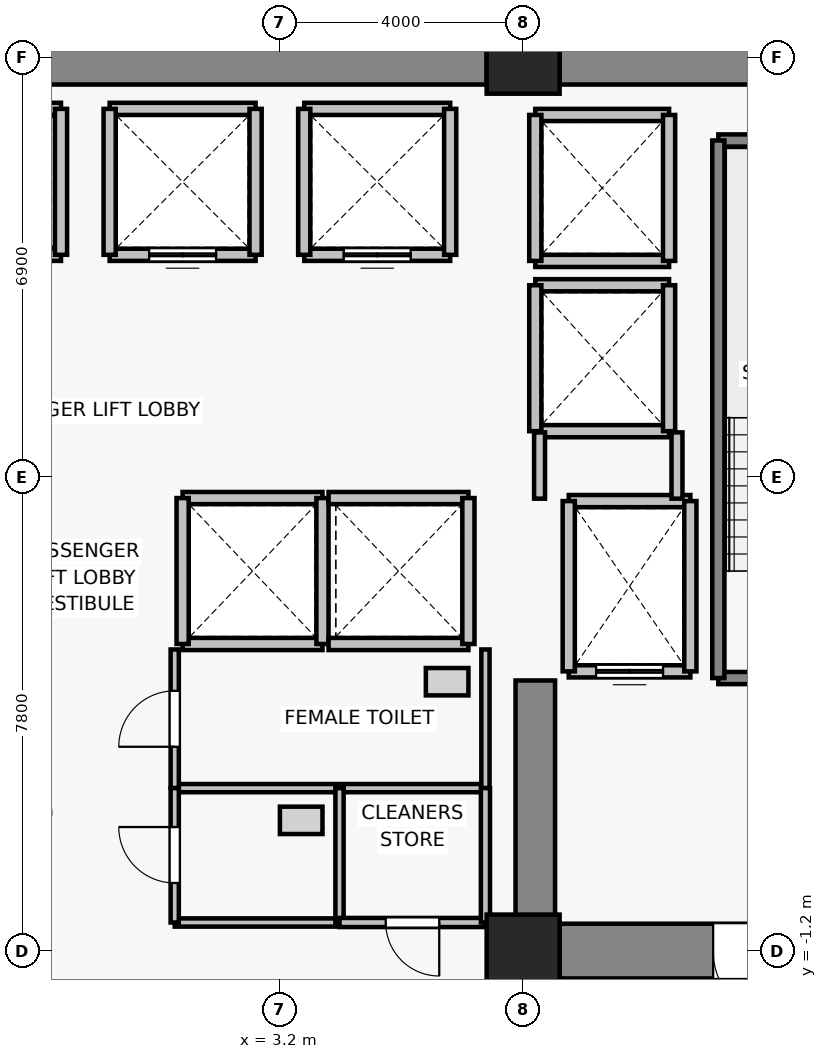
"""IFC4 building model, lengths in metres.
Left out: names, types, materials, properties, quantities, classifications, styles, units other than length and angle.
Written with IfcOpenShell. Run it as: python <this file> out.ifc"""

import sys

from ifc_helpers import new_model, si_unit, direction, frame, frame_2d, origin, origin_2d, place, context, subcontext, project, spatial, rectangle, extrude, source, transform, mapped, element, fill, save


model = new_model("IFC4")
c1 = context("Model", 3, precision=1e-05, world=origin(), true_north=direction((0.0, 1.0)))
c2 = subcontext(c1, "Body", "Model", "MODEL_VIEW")
j1 = project(units=[si_unit("LENGTHUNIT", "METRE"), si_unit("PLANEANGLEUNIT", "RADIAN")], contexts=[c1])
p1 = place(None, origin())
s1 = spatial("IfcSite", under=j1, at=p1, CompositionType="ELEMENT")
p2 = place(p1, origin())
s2 = spatial("IfcBuilding", under=s1, at=p2, CompositionType="ELEMENT")
p3 = place(p2, frame((0.0, 0.0, 76.9)))
s3 = spatial("IfcBuildingStorey", under=s2, at=p3, CompositionType="ELEMENT", Elevation=76.9)
for number, where, z_axis, x_axis in (
    (1, (7.2, -1.2, 0.0), (0.0, 0.0, 1.0), (1.0, 0.0, 0.0)),
    (2, (7.2, 13.5, 0.0), (0.0, 0.0, 1.0), (1.0, 0.0, 0.0)),
):
    element("IfcColumn", number, at=place(p3, frame(where, z_axis=z_axis, x_axis=x_axis)), inside=s3, PredefinedType="COLUMN", context=c2, shape_type="SweptSolid", body=[
        extrude(rectangle(XDim=1.2, YDim=1.2, at=origin_2d()), origin(), (0.0, 0.0, 1.0), 3.3),
    ])
p4 = place(p3, frame((-6.6, 13.5, 0.0), z_axis=(0.0, 0.0, 1.0), x_axis=(1.0, 0.0, 0.0)))
e3 = element("IfcWall", 3, at=p4, inside=s3, PredefinedType="SHEAR", context=c2, shape_type="SweptSolid", body=[
    extrude(rectangle(XDim=13.2, YDim=0.9, at=frame_2d((6.6, 0.0))), origin(), (0.0, 0.0, 1.0), 3.05),
])
p5 = place(p3, frame((7.8, 13.5, 0.0), z_axis=(0.0, 0.0, 1.0), x_axis=(1.0, 0.0, 0.0)))
e4 = element("IfcWall", 4, at=p5, inside=s3, PredefinedType="SHEAR", context=c2, shape_type="SweptSolid", body=[
    extrude(rectangle(XDim=6.0, YDim=0.9, at=frame_2d((3.0, 0.0))), origin(), (0.0, 0.0, 1.0), 3.05),
])
p6 = place(p3, frame((13.8, -1.2, 0.0), z_axis=(0.0, 0.0, 1.0), x_axis=(-1.0, 0.0, 0.0)))
e5 = element("IfcWall", 5, at=p6, inside=s3, PredefinedType="SHEAR", context=c2, shape_type="SweptSolid", body=[
    extrude(rectangle(XDim=6.0, YDim=0.9, at=frame_2d((3.0, 0.0))), origin(), (0.0, 0.0, 1.0), 3.05),
])
p7 = place(p6, frame((2.325, 0.0, 0.0)))
e6 = element("IfcOpeningElement", 6, at=p7, cuts=e5, PredefinedType="OPENING", context=c2, shape_type="SweptSolid", body=[
    extrude(rectangle(XDim=1.15, YDim=2.15, at=frame_2d((0.575, 1.075))), frame((0.0, 0.46, 0.0), z_axis=(0.0, -1.0, 0.0), x_axis=(1.0, 0.0, 0.0)), (0.0, 0.0, 1.0), 0.92),
])
p8 = place(p3, frame((7.4, -0.75, 0.0), z_axis=(0.0, 0.0, 1.0), x_axis=(0.0, 1.0, 0.0)))
e7 = element("IfcWall", 7, at=p8, inside=s3, PredefinedType="SHEAR", context=c2, shape_type="SweptSolid", body=[
    extrude(rectangle(XDim=4.0, YDim=0.65, at=frame_2d((2.0, 0.0))), origin(), (0.0, 0.0, 1.0), 3.05),
])
p9 = place(p3, frame((9.95, 3.4, 0.0), z_axis=(0.0, 0.0, 1.0), x_axis=(-1.0, 0.0, 0.0)))
e8 = element("IfcWall", 8, at=p9, inside=s3, PredefinedType="SOLIDWALL", context=c2, shape_type="SweptSolid", body=[
    extrude(rectangle(XDim=2.0, YDim=0.2, at=frame_2d((1.0, 0.0))), origin(), (0.0, 0.0, 1.0), 3.05),
])
p10 = place(p9, frame((0.45, 0.0, 0.0)))
e9 = element("IfcOpeningElement", 9, at=p10, cuts=e8, PredefinedType="OPENING", context=c2, shape_type="SweptSolid", body=[
    extrude(rectangle(XDim=1.1, YDim=2.2, at=frame_2d((0.55, 1.1))), frame((0.0, 0.11, 0.0), z_axis=(0.0, -1.0, 0.0), x_axis=(1.0, 0.0, 0.0)), (0.0, 0.0, 1.0), 0.22),
])
p11 = place(p3, frame((7.95, 6.2, 0.0), z_axis=(0.0, 0.0, 1.0), x_axis=(1.0, 0.0, 0.0)))
e10 = element("IfcWall", 10, at=p11, inside=s3, PredefinedType="SOLIDWALL", context=c2, shape_type="SweptSolid", body=[
    extrude(rectangle(XDim=2.0, YDim=0.2, at=frame_2d((1.0, 0.0))), origin(), (0.0, 0.0, 1.0), 3.05),
])
for number, where, z_axis, x_axis in (
    (11, (7.95, 3.4, 0.0), (0.0, 0.0, 1.0), (0.0, 1.0, 0.0)),
    (12, (9.95, 6.2, 0.0), (0.0, 0.0, 1.0), (0.0, -1.0, 0.0)),
):
    element("IfcWall", number, at=place(p3, frame(where, z_axis=z_axis, x_axis=x_axis)), inside=s3, PredefinedType="SOLIDWALL", context=c2, shape_type="SweptSolid", body=[
        extrude(rectangle(XDim=2.8, YDim=0.2, at=frame_2d((1.4, 0.0))), origin(), (0.0, 0.0, 1.0), 3.05),
    ])
p12 = place(p3, frame((-0.4, 10.25, 0.0), z_axis=(0.0, 0.0, 1.0), x_axis=(-1.0, 0.0, 0.0)))
e13 = element("IfcWall", 13, at=p12, inside=s3, PredefinedType="SOLIDWALL", context=c2, shape_type="SweptSolid", body=[
    extrude(rectangle(XDim=2.4, YDim=0.2, at=frame_2d((1.2, 0.0))), origin(), (0.0, 0.0, 1.0), 3.05),
])
p13 = place(p12, frame((0.65, 0.0, 0.0)))
e14 = element("IfcOpeningElement", 14, at=p13, cuts=e13, PredefinedType="OPENING", context=c2, shape_type="SweptSolid", body=[
    extrude(rectangle(XDim=1.1, YDim=2.2, at=frame_2d((0.55, 1.1))), frame((0.0, 0.11, 0.0), z_axis=(0.0, -1.0, 0.0), x_axis=(1.0, 0.0, 0.0)), (0.0, 0.0, 1.0), 0.22),
])
p14 = place(p3, frame((-2.8, 12.65, 0.0), z_axis=(0.0, 0.0, 1.0), x_axis=(1.0, 0.0, 0.0)))
e15 = element("IfcWall", 15, at=p14, inside=s3, PredefinedType="SOLIDWALL", context=c2, shape_type="SweptSolid", body=[
    extrude(rectangle(XDim=2.4, YDim=0.2, at=frame_2d((1.2, 0.0))), origin(), (0.0, 0.0, 1.0), 3.05),
])
p15 = place(p3, frame((-0.4, 12.65, 0.0), z_axis=(0.0, 0.0, 1.0), x_axis=(0.0, -1.0, 0.0)))
e16 = element("IfcWall", 16, at=p15, inside=s3, PredefinedType="SOLIDWALL", context=c2, shape_type="SweptSolid", body=[
    extrude(rectangle(XDim=2.4, YDim=0.2, at=frame_2d((1.2, 0.0))), origin(), (0.0, 0.0, 1.0), 3.05),
])
p16 = place(p3, frame((2.8, 10.25, 0.0), z_axis=(0.0, 0.0, 1.0), x_axis=(-1.0, 0.0, 0.0)))
e17 = element("IfcWall", 17, at=p16, inside=s3, PredefinedType="SOLIDWALL", context=c2, shape_type="SweptSolid", body=[
    extrude(rectangle(XDim=2.4, YDim=0.2, at=frame_2d((1.2, 0.0))), origin(), (0.0, 0.0, 1.0), 3.05),
])
p17 = place(p16, frame((0.65, 0.0, 0.0)))
e18 = element("IfcOpeningElement", 18, at=p17, cuts=e17, PredefinedType="OPENING", context=c2, shape_type="SweptSolid", body=[
    extrude(rectangle(XDim=1.1, YDim=2.2, at=frame_2d((0.55, 1.1))), frame((0.0, 0.11, 0.0), z_axis=(0.0, -1.0, 0.0), x_axis=(1.0, 0.0, 0.0)), (0.0, 0.0, 1.0), 0.22),
])
p18 = place(p3, frame((0.4, 12.65, 0.0), z_axis=(0.0, 0.0, 1.0), x_axis=(1.0, 0.0, 0.0)))
e19 = element("IfcWall", 19, at=p18, inside=s3, PredefinedType="SOLIDWALL", context=c2, shape_type="SweptSolid", body=[
    extrude(rectangle(XDim=2.4, YDim=0.2, at=frame_2d((1.2, 0.0))), origin(), (0.0, 0.0, 1.0), 3.05),
])
for number, where, z_axis, x_axis in (
    (20, (0.4, 10.25, 0.0), (0.0, 0.0, 1.0), (0.0, 1.0, 0.0)),
    (21, (2.8, 12.65, 0.0), (0.0, 0.0, 1.0), (0.0, -1.0, 0.0)),
):
    element("IfcWall", number, at=place(p3, frame(where, z_axis=z_axis, x_axis=x_axis)), inside=s3, PredefinedType="SOLIDWALL", context=c2, shape_type="SweptSolid", body=[
        extrude(rectangle(XDim=2.4, YDim=0.2, at=frame_2d((1.2, 0.0))), origin(), (0.0, 0.0, 1.0), 3.05),
    ])
p19 = place(p3, frame((6.0, 10.25, 0.0), z_axis=(0.0, 0.0, 1.0), x_axis=(-1.0, 0.0, 0.0)))
e22 = element("IfcWall", 22, at=p19, inside=s3, PredefinedType="SOLIDWALL", context=c2, shape_type="SweptSolid", body=[
    extrude(rectangle(XDim=2.4, YDim=0.2, at=frame_2d((1.2, 0.0))), origin(), (0.0, 0.0, 1.0), 3.05),
])
p20 = place(p19, frame((0.65, 0.0, 0.0)))
e23 = element("IfcOpeningElement", 23, at=p20, cuts=e22, PredefinedType="OPENING", context=c2, shape_type="SweptSolid", body=[
    extrude(rectangle(XDim=1.1, YDim=2.2, at=frame_2d((0.55, 1.1))), frame((0.0, 0.11, 0.0), z_axis=(0.0, -1.0, 0.0), x_axis=(1.0, 0.0, 0.0)), (0.0, 0.0, 1.0), 0.22),
])
for number, where, z_axis, x_axis in (
    (24, (3.6, 12.65, 0.0), (0.0, 0.0, 1.0), (1.0, 0.0, 0.0)),
    (25, (3.6, 10.25, 0.0), (0.0, 0.0, 1.0), (0.0, 1.0, 0.0)),
    (26, (6.0, 12.65, 0.0), (0.0, 0.0, 1.0), (0.0, -1.0, 0.0)),
):
    element("IfcWall", number, at=place(p3, frame(where, z_axis=z_axis, x_axis=x_axis)), inside=s3, PredefinedType="SOLIDWALL", context=c2, shape_type="SweptSolid", body=[
        extrude(rectangle(XDim=2.4, YDim=0.2, at=frame_2d((1.2, 0.0))), origin(), (0.0, 0.0, 1.0), 3.05),
    ])
for number, where, z_axis, x_axis in (
    (27, (3.9, 3.85, 0.0), (0.0, 0.0, 1.0), (-1.0, 0.0, 0.0)),
    (28, (1.6, 6.25, 0.0), (0.0, 0.0, 1.0), (1.0, 0.0, 0.0)),
):
    element("IfcWall", number, at=place(p3, frame(where, z_axis=z_axis, x_axis=x_axis)), inside=s3, PredefinedType="SOLIDWALL", context=c2, shape_type="SweptSolid", body=[
        extrude(rectangle(XDim=2.3, YDim=0.2, at=frame_2d((1.15, 0.0))), origin(), (0.0, 0.0, 1.0), 3.05),
    ])
for number, where, z_axis, x_axis in (
    (29, (1.6, 3.85, 0.0), (0.0, 0.0, 1.0), (0.0, 1.0, 0.0)),
    (30, (3.9, 6.25, 0.0), (0.0, 0.0, 1.0), (0.0, -1.0, 0.0)),
):
    element("IfcWall", number, at=place(p3, frame(where, z_axis=z_axis, x_axis=x_axis)), inside=s3, PredefinedType="SOLIDWALL", context=c2, shape_type="SweptSolid", body=[
        extrude(rectangle(XDim=2.4, YDim=0.2, at=frame_2d((1.2, 0.0))), origin(), (0.0, 0.0, 1.0), 3.05),
    ])
for number, where, z_axis, x_axis in (
    (31, (6.3, 3.85, 0.0), (0.0, 0.0, 1.0), (-1.0, 0.0, 0.0)),
    (32, (4.0, 6.25, 0.0), (0.0, 0.0, 1.0), (1.0, 0.0, 0.0)),
):
    element("IfcWall", number, at=place(p3, frame(where, z_axis=z_axis, x_axis=x_axis)), inside=s3, PredefinedType="SOLIDWALL", context=c2, shape_type="SweptSolid", body=[
        extrude(rectangle(XDim=2.3, YDim=0.2, at=frame_2d((1.15, 0.0))), origin(), (0.0, 0.0, 1.0), 3.05),
    ])
p21 = place(p3, frame((6.3, 6.25, 0.0), z_axis=(0.0, 0.0, 1.0), x_axis=(0.0, -1.0, 0.0)))
e33 = element("IfcWall", 33, at=p21, inside=s3, PredefinedType="SOLIDWALL", context=c2, shape_type="SweptSolid", body=[
    extrude(rectangle(XDim=2.4, YDim=0.2, at=frame_2d((1.2, 0.0))), origin(), (0.0, 0.0, 1.0), 3.05),
])
for number, where, z_axis, x_axis in (
    (34, (9.6, 7.35, 0.0), (0.0, 0.0, 1.0), (-1.0, 0.0, 0.0)),
    (35, (7.4, 9.75, 0.0), (0.0, 0.0, 1.0), (1.0, 0.0, 0.0)),
):
    element("IfcWall", number, at=place(p3, frame(where, z_axis=z_axis, x_axis=x_axis)), inside=s3, PredefinedType="SOLIDWALL", context=c2, shape_type="SweptSolid", body=[
        extrude(rectangle(XDim=2.2, YDim=0.2, at=frame_2d((1.1, 0.0))), origin(), (0.0, 0.0, 1.0), 2.44),
    ])
p22 = place(p3, frame((7.4, 7.35, 0.0), z_axis=(0.0, 0.0, 1.0), x_axis=(0.0, 1.0, 0.0)))
e36 = element("IfcWall", 36, at=p22, inside=s3, PredefinedType="SOLIDWALL", context=c2, shape_type="SweptSolid", body=[
    extrude(rectangle(XDim=2.4, YDim=0.2, at=frame_2d((1.2, 0.0))), origin(), (0.0, 0.0, 1.0), 2.44),
])
p23 = place(p3, frame((9.6, 9.75, 0.0), z_axis=(0.0, 0.0, 1.0), x_axis=(0.0, -1.0, 0.0)))
e37 = element("IfcWall", 37, at=p23, inside=s3, PredefinedType="SOLIDWALL", context=c2, shape_type="SweptSolid", body=[
    extrude(rectangle(XDim=2.4, YDim=0.2, at=frame_2d((1.2, 0.0))), origin(), (0.0, 0.0, 1.0), 3.05),
])
for number, where, z_axis, x_axis in (
    (38, (9.6, 10.15, 0.0), (0.0, 0.0, 1.0), (-1.0, 0.0, 0.0)),
    (39, (7.4, 12.55, 0.0), (0.0, 0.0, 1.0), (1.0, 0.0, 0.0)),
):
    element("IfcWall", number, at=place(p3, frame(where, z_axis=z_axis, x_axis=x_axis)), inside=s3, PredefinedType="SOLIDWALL", context=c2, shape_type="SweptSolid", body=[
        extrude(rectangle(XDim=2.2, YDim=0.2, at=frame_2d((1.1, 0.0))), origin(), (0.0, 0.0, 1.0), 2.44),
    ])
p24 = place(p3, frame((7.4, 10.15, 0.0), z_axis=(0.0, 0.0, 1.0), x_axis=(0.0, 1.0, 0.0)))
e40 = element("IfcWall", 40, at=p24, inside=s3, PredefinedType="SOLIDWALL", context=c2, shape_type="SweptSolid", body=[
    extrude(rectangle(XDim=2.4, YDim=0.2, at=frame_2d((1.2, 0.0))), origin(), (0.0, 0.0, 1.0), 2.44),
])
p25 = place(p3, frame((9.6, 12.55, 0.0), z_axis=(0.0, 0.0, 1.0), x_axis=(0.0, -1.0, 0.0)))
e41 = element("IfcWall", 41, at=p25, inside=s3, PredefinedType="SOLIDWALL", context=c2, shape_type="SweptSolid", body=[
    extrude(rectangle(XDim=2.4, YDim=0.2, at=frame_2d((1.2, 0.0))), origin(), (0.0, 0.0, 1.0), 3.05),
])
p26 = place(p3, frame((13.93, 3.29, 0.0), z_axis=(0.0, 0.0, 1.0), x_axis=(-1.0, 0.0, 0.0)))
e42 = element("IfcWall", 42, at=p26, inside=s3, PredefinedType="SOLIDWALL", context=c2, shape_type="SweptSolid", body=[
    extrude(rectangle(XDim=3.52, YDim=0.2, at=frame_2d((1.76, 0.0))), origin(), (0.0, 0.0, 1.0), 3.05),
])
p27 = place(p26, frame((1.205, 0.0, 0.0)))
e43 = element("IfcOpeningElement", 43, at=p27, cuts=e42, PredefinedType="OPENING", context=c2, shape_type="SweptSolid", body=[
    extrude(rectangle(XDim=1.15, YDim=2.15, at=frame_2d((0.575, 1.075))), frame((0.0, 0.11, 0.0), z_axis=(0.0, -1.0, 0.0), x_axis=(1.0, 0.0, 0.0)), (0.0, 0.0, 1.0), 0.22),
])
p28 = place(p3, frame((10.41, 12.13, 0.0), z_axis=(0.0, 0.0, 1.0), x_axis=(1.0, 0.0, 0.0)))
e44 = element("IfcWall", 44, at=p28, inside=s3, PredefinedType="SOLIDWALL", context=c2, shape_type="SweptSolid", body=[
    extrude(rectangle(XDim=3.52, YDim=0.2, at=frame_2d((1.76, 0.0))), origin(), (0.0, 0.0, 1.0), 3.05),
])
p29 = place(p3, frame((10.41, 3.29, 0.0), z_axis=(0.0, 0.0, 1.0), x_axis=(0.0, 1.0, 0.0)))
e45 = element("IfcWall", 45, at=p29, inside=s3, PredefinedType="SOLIDWALL", context=c2, shape_type="SweptSolid", body=[
    extrude(rectangle(XDim=8.84, YDim=0.2, at=frame_2d((4.42, 0.0))), origin(), (0.0, 0.0, 1.0), 3.05),
])
p30 = place(p3, frame((7.47, 6.24, 0.0), z_axis=(0.0, 0.0, 1.0), x_axis=(0.0, 1.0, 0.0)))
e46 = element("IfcWall", 46, at=p30, inside=s3, PredefinedType="PARTITIONING", context=c2, shape_type="SweptSolid", body=[
    extrude(rectangle(XDim=1.09, YDim=0.18, at=frame_2d((0.545, 0.0))), origin(), (0.0, 0.0, 1.0), 2.44),
])
p31 = place(p3, frame((9.73, 7.33, 0.0), z_axis=(0.0, 0.0, 1.0), x_axis=(0.0, -1.0, 0.0)))
e47 = element("IfcWall", 47, at=p31, inside=s3, PredefinedType="PARTITIONING", context=c2, shape_type="SweptSolid", body=[
    extrude(rectangle(XDim=1.09, YDim=0.18, at=frame_2d((0.545, 0.0))), origin(), (0.0, 0.0, 1.0), 3.05),
])
p32 = place(p3, frame((6.58, 1.48, 0.0), z_axis=(0.0, 0.0, 1.0), x_axis=(-1.0, 0.0, 0.0)))
e48 = element("IfcWall", 48, at=p32, inside=s3, PredefinedType="PARTITIONING", context=c2, shape_type="SweptSolid", body=[
    extrude(rectangle(XDim=5.11, YDim=0.135, at=frame_2d((2.555, 0.0))), origin(), (0.0, 0.0, 1.0), 3.05),
])
p33 = place(p3, frame((1.47, 1.48, 0.0), z_axis=(0.0, 0.0, 1.0), x_axis=(0.0, 1.0, 0.0)))
e49 = element("IfcWall", 49, at=p33, inside=s3, PredefinedType="PARTITIONING", context=c2, shape_type="SweptSolid", body=[
    extrude(rectangle(XDim=2.28, YDim=0.135, at=frame_2d((1.14, 0.0))), origin(), (0.0, 0.0, 1.0), 3.05),
])
p34 = place(p33, frame((0.68, 0.0, 0.0)))
e50 = element("IfcOpeningElement", 50, at=p34, cuts=e49, PredefinedType="OPENING", context=c2, shape_type="SweptSolid", body=[
    extrude(rectangle(XDim=0.92, YDim=2.1, at=frame_2d((0.46, 1.05))), frame((0.0, 0.077, 0.0), z_axis=(0.0, -1.0, 0.0), x_axis=(1.0, 0.0, 0.0)), (0.0, 0.0, 1.0), 0.155),
])
p35 = place(p3, frame((6.58, 3.76, 0.0), z_axis=(0.0, 0.0, 1.0), x_axis=(0.0, -1.0, 0.0)))
e51 = element("IfcWall", 51, at=p35, inside=s3, PredefinedType="PARTITIONING", context=c2, shape_type="SweptSolid", body=[
    extrude(rectangle(XDim=2.28, YDim=0.135, at=frame_2d((1.14, 0.0))), origin(), (0.0, 0.0, 1.0), 3.05),
])
p36 = place(p3, frame((4.18, -0.73, 0.0), z_axis=(0.0, 0.0, 1.0), x_axis=(-1.0, 0.0, 0.0)))
e52 = element("IfcWall", 52, at=p36, inside=s3, PredefinedType="PARTITIONING", context=c2, shape_type="SweptSolid", body=[
    extrude(rectangle(XDim=2.71, YDim=0.135, at=frame_2d((1.355, 0.0))), origin(), (0.0, 0.0, 1.0), 3.05),
])
p37 = place(p3, frame((1.47, -0.73, 0.0), z_axis=(0.0, 0.0, 1.0), x_axis=(0.0, 1.0, 0.0)))
e53 = element("IfcWall", 53, at=p37, inside=s3, PredefinedType="PARTITIONING", context=c2, shape_type="SweptSolid", body=[
    extrude(rectangle(XDim=2.21, YDim=0.135, at=frame_2d((1.105, 0.0))), origin(), (0.0, 0.0, 1.0), 3.05),
])
p38 = place(p37, frame((0.65, 0.0, 0.0)))
e54 = element("IfcOpeningElement", 54, at=p38, cuts=e53, PredefinedType="OPENING", context=c2, shape_type="SweptSolid", body=[
    extrude(rectangle(XDim=0.92, YDim=2.1, at=frame_2d((0.46, 1.05))), frame((0.0, 0.077, 0.0), z_axis=(0.0, -1.0, 0.0), x_axis=(1.0, 0.0, 0.0)), (0.0, 0.0, 1.0), 0.155),
])
p39 = place(p3, frame((4.18, 1.48, 0.0), z_axis=(0.0, 0.0, 1.0), x_axis=(0.0, -1.0, 0.0)))
e55 = element("IfcWall", 55, at=p39, inside=s3, PredefinedType="PARTITIONING", context=c2, shape_type="SweptSolid", body=[
    extrude(rectangle(XDim=2.21, YDim=0.135, at=frame_2d((1.105, 0.0))), origin(), (0.0, 0.0, 1.0), 3.05),
])
p40 = place(p3, frame((6.58, -0.73, 0.0), z_axis=(0.0, 0.0, 1.0), x_axis=(-1.0, 0.0, 0.0)))
e56 = element("IfcWall", 56, at=p40, inside=s3, PredefinedType="PARTITIONING", context=c2, shape_type="SweptSolid", body=[
    extrude(rectangle(XDim=2.4, YDim=0.15, at=frame_2d((1.2, 0.0))), origin(), (0.0, 0.0, 1.0), 3.05),
])
p41 = place(p40, frame((0.76, 0.0, 0.0)))
e57 = element("IfcOpeningElement", 57, at=p41, cuts=e56, PredefinedType="OPENING", context=c2, shape_type="SweptSolid", body=[
    extrude(rectangle(XDim=0.88, YDim=2.1, at=frame_2d((0.44, 1.05))), frame((0.0, 0.085, 0.0), z_axis=(0.0, -1.0, 0.0), x_axis=(1.0, 0.0, 0.0)), (0.0, 0.0, 1.0), 0.17),
])
p42 = place(p3, frame((6.58, 1.48, 0.0), z_axis=(0.0, 0.0, 1.0), x_axis=(0.0, -1.0, 0.0)))
e58 = element("IfcWall", 58, at=p42, inside=s3, PredefinedType="PARTITIONING", context=c2, shape_type="SweptSolid", body=[
    extrude(rectangle(XDim=2.21, YDim=0.15, at=frame_2d((1.105, 0.0))), origin(), (0.0, 0.0, 1.0), 3.05),
])
m1 = source(origin(), c2, "Body", "SweptSolid", [
    extrude(rectangle(XDim=1.1, YDim=2.2, at=frame_2d((0.55, 1.1))), frame((0.0, 0.025, 0.0), z_axis=(0.0, -1.0, 0.0), x_axis=(1.0, 0.0, 0.0)), (0.0, 0.0, 1.0), 0.05),
])
p43 = place(p10, origin())
e59 = element("IfcDoor", 59, at=p43, inside=s3, OperationType="DOUBLE_DOOR_SLIDING", PredefinedType="DOOR", context=c2, shape_type="MappedRepresentation", body=[
    mapped(m1, transform((0.0, 0.0, 0.0), x_axis=(1.0, 0.0, 0.0), y_axis=(0.0, 1.0, 0.0), z_axis=(0.0, 0.0, 1.0), scale=1.0)),
])
fill(e9, e59)
p44 = place(p17, origin())
e60 = element("IfcDoor", 60, at=p44, inside=s3, OperationType="DOUBLE_DOOR_SLIDING", PredefinedType="DOOR", context=c2, shape_type="MappedRepresentation", body=[
    mapped(m1, transform((0.0, 0.0, 0.0), x_axis=(1.0, 0.0, 0.0), y_axis=(0.0, 1.0, 0.0), z_axis=(0.0, 0.0, 1.0), scale=1.0)),
])
fill(e18, e60)
p45 = place(p20, origin())
e61 = element("IfcDoor", 61, at=p45, inside=s3, OperationType="DOUBLE_DOOR_SLIDING", PredefinedType="DOOR", context=c2, shape_type="MappedRepresentation", body=[
    mapped(m1, transform((0.0, 0.0, 0.0), x_axis=(1.0, 0.0, 0.0), y_axis=(0.0, 1.0, 0.0), z_axis=(0.0, 0.0, 1.0), scale=1.0)),
])
fill(e23, e61)
m2 = source(origin(), c2, "Body", "SweptSolid", [
    extrude(rectangle(XDim=1.15, YDim=2.15, at=frame_2d((0.575, 1.075))), frame((0.0, 0.025, 0.0), z_axis=(0.0, -1.0, 0.0), x_axis=(1.0, 0.0, 0.0)), (0.0, 0.0, 1.0), 0.05),
])
p46 = place(p7, origin())
e62 = element("IfcDoor", 62, at=p46, inside=s3, OperationType="SINGLE_SWING_LEFT", PredefinedType="DOOR", context=c2, shape_type="MappedRepresentation", body=[
    mapped(m2, transform((0.0, 0.0, 0.0), x_axis=(1.0, 0.0, 0.0), y_axis=(0.0, 1.0, 0.0), z_axis=(0.0, 0.0, 1.0), scale=1.0)),
])
fill(e6, e62)
m3 = source(origin(), c2, "Body", "SweptSolid", [
    extrude(rectangle(XDim=0.92, YDim=2.1, at=frame_2d((0.46, 1.05))), frame((0.0, 0.025, 0.0), z_axis=(0.0, -1.0, 0.0), x_axis=(1.0, 0.0, 0.0)), (0.0, 0.0, 1.0), 0.05),
])
p47 = place(p34, origin())
e63 = element("IfcDoor", 63, at=p47, inside=s3, OperationType="SINGLE_SWING_LEFT", PredefinedType="DOOR", context=c2, shape_type="MappedRepresentation", body=[
    mapped(m3, transform((0.0, 0.0, 0.0), x_axis=(1.0, 0.0, 0.0), y_axis=(0.0, 1.0, 0.0), z_axis=(0.0, 0.0, 1.0), scale=1.0)),
])
fill(e50, e63)
p48 = place(p38, origin())
e64 = element("IfcDoor", 64, at=p48, inside=s3, OperationType="SINGLE_SWING_RIGHT", PredefinedType="DOOR", context=c2, shape_type="MappedRepresentation", body=[
    mapped(m3, transform((0.0, 0.0, 0.0), x_axis=(1.0, 0.0, 0.0), y_axis=(0.0, 1.0, 0.0), z_axis=(0.0, 0.0, 1.0), scale=1.0)),
])
fill(e54, e64)
m4 = source(origin(), c2, "Body", "SweptSolid", [
    extrude(rectangle(XDim=0.88, YDim=2.1, at=frame_2d((0.44, 1.05))), frame((0.0, 0.025, 0.0), z_axis=(0.0, -1.0, 0.0), x_axis=(1.0, 0.0, 0.0)), (0.0, 0.0, 1.0), 0.05),
])
p49 = place(p41, origin())
e65 = element("IfcDoor", 65, at=p49, inside=s3, OperationType="SINGLE_SWING_LEFT", PredefinedType="DOOR", context=c2, shape_type="MappedRepresentation", body=[
    mapped(m4, transform((0.0, 0.0, 0.0), x_axis=(1.0, 0.0, 0.0), y_axis=(0.0, 1.0, 0.0), z_axis=(0.0, 0.0, 1.0), scale=1.0)),
])
fill(e57, e65)
save(model, sys.argv[1])
